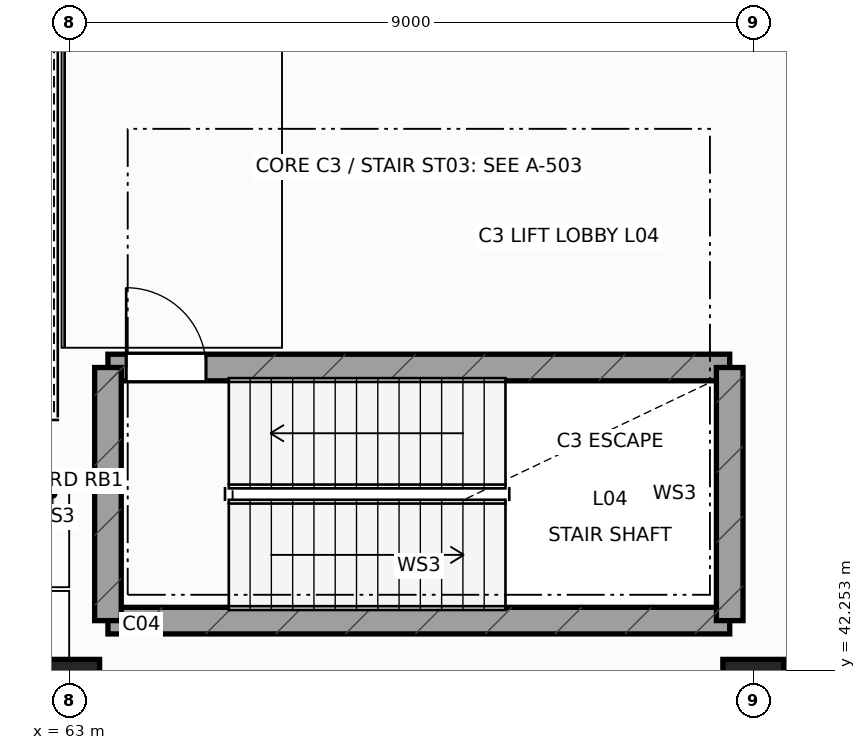
"""IFC4 building model, lengths in metres.
Left out: names, types, materials, properties, quantities, classifications, styles, units other than length and angle.
Written with IfcOpenShell. Run it as: python <this file> out.ifc"""

import sys

from ifc_helpers import new_model, si_unit, direction, frame, frame_2d, origin, origin_2d, place, context, subcontext, project, spatial, rectangle, extrude, element, fill, save


model = new_model("IFC4")
c1 = context("Model", 3, precision=1e-05, world=origin(), true_north=direction((0.0, 1.0)))
c2 = subcontext(c1, "Body", "Model", "MODEL_VIEW")
j1 = project(units=[si_unit("LENGTHUNIT", "METRE"), si_unit("PLANEANGLEUNIT", "RADIAN")], contexts=[c1])
p1 = place(None, origin())
s1 = spatial("IfcSite", under=j1, at=p1, CompositionType="ELEMENT")
p2 = place(p1, origin())
s2 = spatial("IfcBuilding", under=s1, at=p2, CompositionType="ELEMENT")
p3 = place(p2, frame((0.0, 0.0, 21.6)))
s3 = spatial("IfcBuildingStorey", under=s2, at=p3, CompositionType="ELEMENT", Elevation=21.6)
for number, where, z_axis, x_axis in (
    (1, (63.0, 42.0, 0.0), (0.0, 0.0, 1.0), (1.0, 0.0, 0.0)),
    (2, (72.0, 42.0, 0.0), (0.0, 0.0, 1.0), (1.0, 0.0, 0.0)),
):
    element("IfcColumn", number, at=place(p3, frame(where, z_axis=z_axis, x_axis=x_axis)), inside=s3, PredefinedType="COLUMN", context=c2, shape_type="SweptSolid", body=[
        extrude(rectangle(XDim=0.8, YDim=0.8, at=origin_2d()), origin(), (0.0, 0.0, 1.0), 4.8),
    ])
p4 = place(p3, frame((63.51, 42.91, 0.0), z_axis=(0.0, 0.0, 1.0), x_axis=(1.0, 0.0, 0.0)))
e3 = element("IfcWall", 3, at=p4, inside=s3, PredefinedType="SHEAR", context=c2, shape_type="SweptSolid", body=[
    extrude(rectangle(XDim=8.18, YDim=0.35, at=frame_2d((4.09, 0.0))), origin(), (0.0, 0.0, 1.0), 4.54),
])
p5 = place(p3, frame((63.51, 46.24, 0.0), z_axis=(0.0, 0.0, 1.0), x_axis=(1.0, 0.0, 0.0)))
e4 = element("IfcWall", 4, at=p5, inside=s3, PredefinedType="SHEAR", context=c2, shape_type="SweptSolid", body=[
    extrude(rectangle(XDim=8.18, YDim=0.35, at=frame_2d((4.09, 0.0))), origin(), (0.0, 0.0, 1.0), 4.54),
])
p6 = place(p5, frame((0.24, 0.0, 0.0)))
e5 = element("IfcOpeningElement", 5, at=p6, cuts=e4, PredefinedType="OPENING", context=c2, shape_type="SweptSolid", body=[
    extrude(rectangle(XDim=1.05, YDim=2.18, at=frame_2d((0.525, 1.09))), frame((0.0, 0.185, 0.0), z_axis=(0.0, -1.0, 0.0), x_axis=(1.0, 0.0, 0.0)), (0.0, 0.0, 1.0), 0.37),
])
for number, where, z_axis, x_axis in (
    (6, (63.51, 42.91, 0.0), (0.0, 0.0, 1.0), (0.0, 1.0, 0.0)),
    (7, (71.69, 42.91, 0.0), (0.0, 0.0, 1.0), (0.0, 1.0, 0.0)),
):
    element("IfcWall", number, at=place(p3, frame(where, z_axis=z_axis, x_axis=x_axis)), inside=s3, PredefinedType="SHEAR", context=c2, shape_type="SweptSolid", body=[
        extrude(rectangle(XDim=3.33, YDim=0.35, at=frame_2d((1.665, 0.0))), origin(), (0.0, 0.0, 1.0), 4.54),
    ])
p7 = place(p6, origin())
e8 = element("IfcDoor", 8, at=p7, inside=s3, OperationType="SINGLE_SWING_LEFT", PredefinedType="DOOR", context=c2, shape_type="SweptSolid", body=[
    extrude(rectangle(XDim=1.05, YDim=2.18, at=frame_2d((0.525, 1.09))), frame((0.0, 0.025, 0.0), z_axis=(0.0, -1.0, 0.0), x_axis=(1.0, 0.0, 0.0)), (0.0, 0.0, 1.0), 0.05),
])
fill(e5, e8)
save(model, sys.argv[1])
